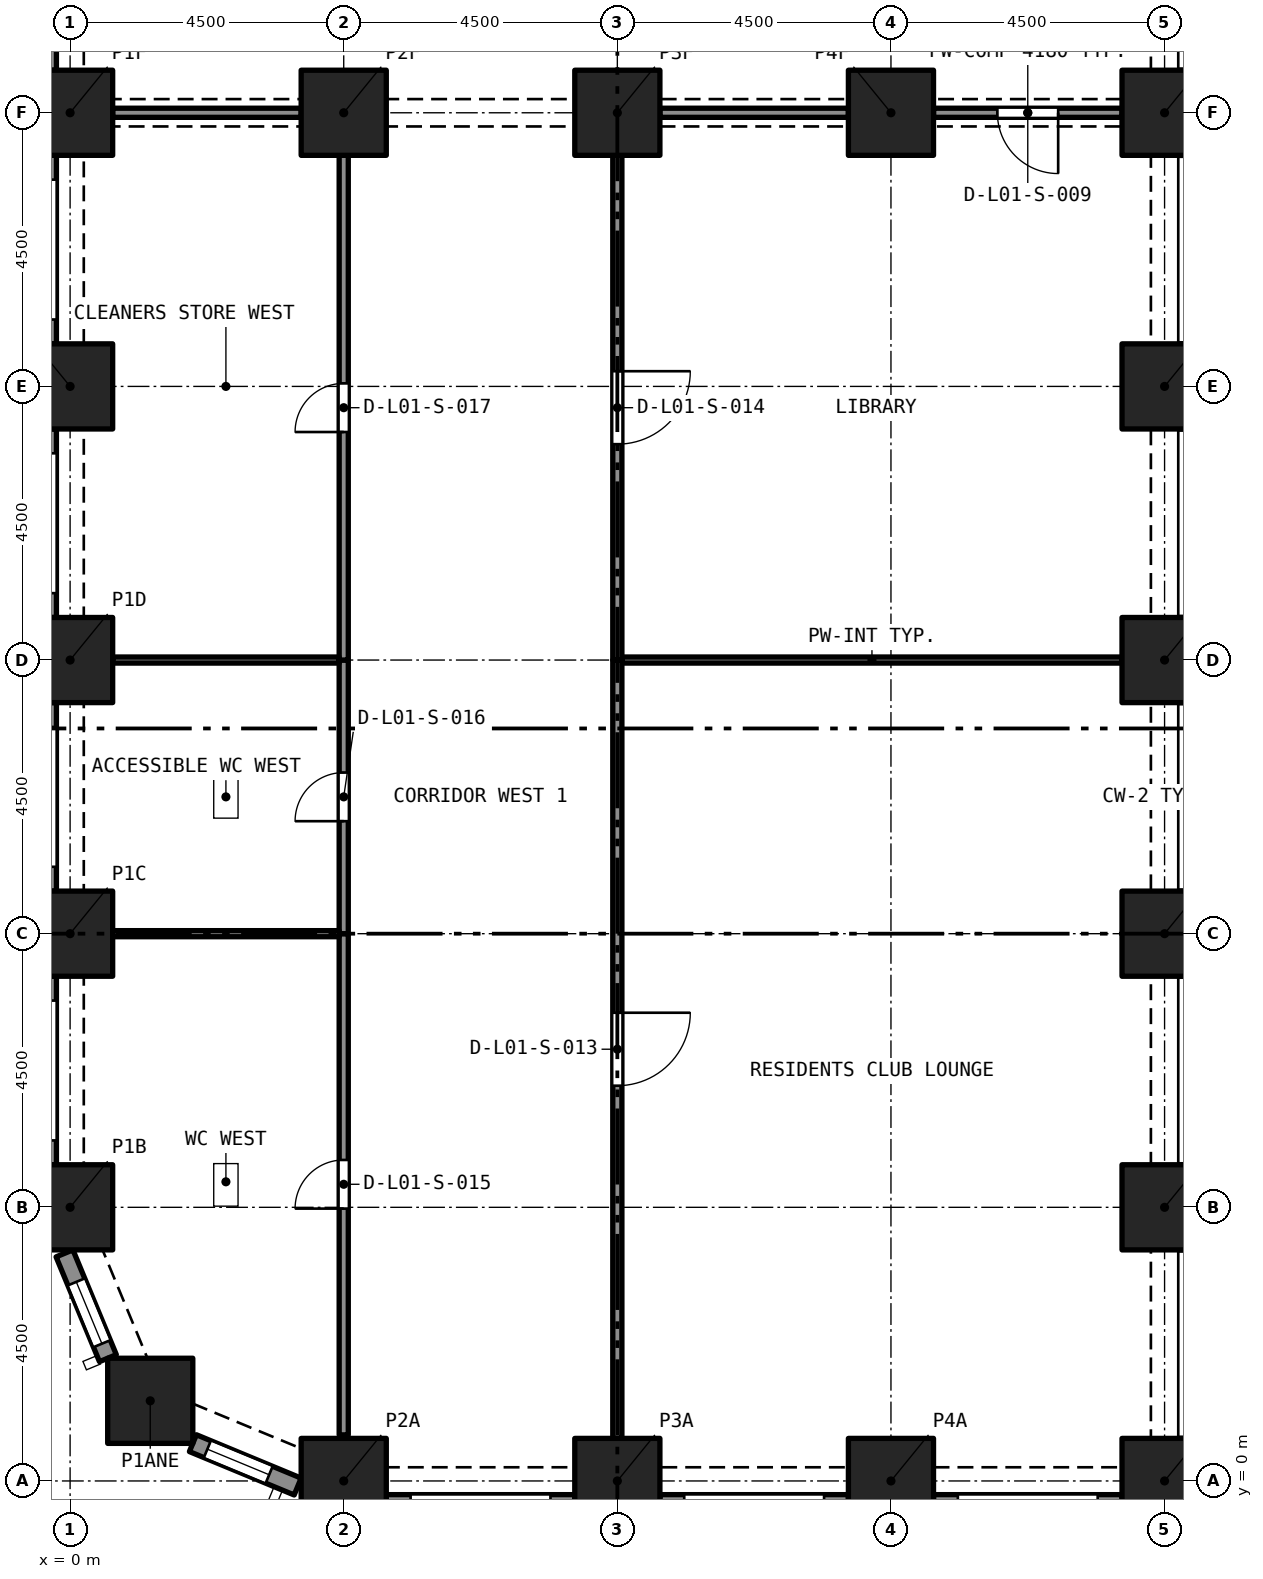
"""IFC4 building model, lengths in metres.
Left out: names, types, materials, properties, quantities, classifications, styles, units other than length and angle.
Written with IfcOpenShell. Run it as: python <this file> out.ifc"""

import sys

from ifc_helpers import new_model, si_unit, direction, frame, frame_2d, origin, origin_2d, place, context, subcontext, project, spatial, rectangle, extrude, element, fill, save


model = new_model("IFC4")
c1 = context("Model", 3, precision=1e-05, world=origin(), true_north=direction((0.0, 1.0)))
c2 = subcontext(c1, "Body", "Model", "MODEL_VIEW")
j1 = project(units=[si_unit("LENGTHUNIT", "METRE"), si_unit("PLANEANGLEUNIT", "RADIAN")], contexts=[c1])
p1 = place(None, origin())
s1 = spatial("IfcSite", under=j1, at=p1, CompositionType="ELEMENT")
p2 = place(p1, origin())
s2 = spatial("IfcBuilding", under=s1, at=p2, CompositionType="ELEMENT")
p3 = place(p2, frame((0.0, 0.0, 6.0)))
s3 = spatial("IfcBuildingStorey", under=s2, at=p3, CompositionType="ELEMENT", Elevation=6.0)
for number, where, z_axis, x_axis in (
    (1, (4.5, 0.0, 0.0), (0.0, 0.0, 1.0), (1.0, 0.0, 0.0)),
    (2, (9.0, 0.0, 0.0), (0.0, 0.0, 1.0), (1.0, 0.0, 0.0)),
    (3, (13.5, 0.0, 0.0), (0.0, 0.0, 1.0), (1.0, 0.0, 0.0)),
    (4, (18.0, 0.0, 0.0), (0.0, 0.0, 1.0), (1.0, 0.0, 0.0)),
    (5, (1.318, 1.318, 0.0), (0.0, 0.0, 1.0), (1.0, 0.0, 0.0)),
    (6, (0.0, 4.5, 0.0), (0.0, 0.0, 1.0), (1.0, 0.0, 0.0)),
    (7, (18.0, 4.5, 0.0), (0.0, 0.0, 1.0), (1.0, 0.0, 0.0)),
    (8, (0.0, 9.0, 0.0), (0.0, 0.0, 1.0), (1.0, 0.0, 0.0)),
    (9, (18.0, 9.0, 0.0), (0.0, 0.0, 1.0), (1.0, 0.0, 0.0)),
    (10, (0.0, 13.5, 0.0), (0.0, 0.0, 1.0), (1.0, 0.0, 0.0)),
    (11, (18.0, 13.5, 0.0), (0.0, 0.0, 1.0), (1.0, 0.0, 0.0)),
    (12, (0.0, 18.0, 0.0), (0.0, 0.0, 1.0), (1.0, 0.0, 0.0)),
    (13, (18.0, 18.0, 0.0), (0.0, 0.0, 1.0), (1.0, 0.0, 0.0)),
    (14, (0.0, 22.5, 0.0), (0.0, 0.0, 1.0), (1.0, 0.0, 0.0)),
    (15, (4.5, 22.5, 0.0), (0.0, 0.0, 1.0), (1.0, 0.0, 0.0)),
    (16, (9.0, 22.5, 0.0), (0.0, 0.0, 1.0), (1.0, 0.0, 0.0)),
    (17, (13.5, 22.5, 0.0), (0.0, 0.0, 1.0), (1.0, 0.0, 0.0)),
    (18, (18.0, 22.5, 0.0), (0.0, 0.0, 1.0), (1.0, 0.0, 0.0)),
):
    element("IfcColumn", number, at=place(p3, frame(where, z_axis=z_axis, x_axis=x_axis)), inside=s3, PredefinedType="COLUMN", context=c2, shape_type="SweptSolid", body=[
        extrude(rectangle(XDim=1.4, YDim=1.4, at=origin_2d()), origin(), (0.0, 0.0, 1.0), 5.0),
    ])
p4 = place(p3, frame((-0.375, 23.2, 0.0), z_axis=(0.0, 0.0, 1.0), x_axis=(0.0, 1.0, 0.0)))
e19 = element("IfcWall", 19, at=p4, inside=s3, PredefinedType="SOLIDWALL", context=c2, shape_type="SweptSolid", body=[
    extrude(rectangle(XDim=3.1, YDim=0.3, at=frame_2d((1.55, 0.0))), origin(), (0.0, 0.0, 1.0), 5.0),
])
p5 = place(p4, frame((0.4, 0.0, 0.45)))
e20 = element("IfcOpeningElement", 20, at=p5, cuts=e19, PredefinedType="OPENING", context=c2, shape_type="SweptSolid", body=[
    extrude(rectangle(XDim=2.3, YDim=3.3, at=frame_2d((1.15, 1.65))), frame((0.0, 0.16, 0.0), z_axis=(0.0, -1.0, 0.0), x_axis=(1.0, 0.0, 0.0)), (0.0, 0.0, 1.0), 0.32),
])
p6 = place(p3, frame((-0.375, 18.7, 0.0), z_axis=(0.0, 0.0, 1.0), x_axis=(0.0, 1.0, 0.0)))
e21 = element("IfcWall", 21, at=p6, inside=s3, PredefinedType="SOLIDWALL", context=c2, shape_type="SweptSolid", body=[
    extrude(rectangle(XDim=3.1, YDim=0.3, at=frame_2d((1.55, 0.0))), origin(), (0.0, 0.0, 1.0), 5.0),
])
p7 = place(p6, frame((0.4, 0.0, 0.45)))
e22 = element("IfcOpeningElement", 22, at=p7, cuts=e21, PredefinedType="OPENING", context=c2, shape_type="SweptSolid", body=[
    extrude(rectangle(XDim=2.3, YDim=3.3, at=frame_2d((1.15, 1.65))), frame((0.0, 0.16, 0.0), z_axis=(0.0, -1.0, 0.0), x_axis=(1.0, 0.0, 0.0)), (0.0, 0.0, 1.0), 0.32),
])
p8 = place(p3, frame((-0.375, 14.2, 0.0), z_axis=(0.0, 0.0, 1.0), x_axis=(0.0, 1.0, 0.0)))
e23 = element("IfcWall", 23, at=p8, inside=s3, PredefinedType="SOLIDWALL", context=c2, shape_type="SweptSolid", body=[
    extrude(rectangle(XDim=3.1, YDim=0.3, at=frame_2d((1.55, 0.0))), origin(), (0.0, 0.0, 1.0), 5.0),
])
p9 = place(p8, frame((0.4, 0.0, 0.45)))
e24 = element("IfcOpeningElement", 24, at=p9, cuts=e23, PredefinedType="OPENING", context=c2, shape_type="SweptSolid", body=[
    extrude(rectangle(XDim=2.3, YDim=3.3, at=frame_2d((1.15, 1.65))), frame((0.0, 0.16, 0.0), z_axis=(0.0, -1.0, 0.0), x_axis=(1.0, 0.0, 0.0)), (0.0, 0.0, 1.0), 0.32),
])
p10 = place(p3, frame((-0.375, 9.7, 0.0), z_axis=(0.0, 0.0, 1.0), x_axis=(0.0, 1.0, 0.0)))
e25 = element("IfcWall", 25, at=p10, inside=s3, PredefinedType="SOLIDWALL", context=c2, shape_type="SweptSolid", body=[
    extrude(rectangle(XDim=3.1, YDim=0.3, at=frame_2d((1.55, 0.0))), origin(), (0.0, 0.0, 1.0), 5.0),
])
p11 = place(p10, frame((0.4, 0.0, 0.45)))
e26 = element("IfcOpeningElement", 26, at=p11, cuts=e25, PredefinedType="OPENING", context=c2, shape_type="SweptSolid", body=[
    extrude(rectangle(XDim=2.3, YDim=3.3, at=frame_2d((1.15, 1.65))), frame((0.0, 0.16, 0.0), z_axis=(0.0, -1.0, 0.0), x_axis=(1.0, 0.0, 0.0)), (0.0, 0.0, 1.0), 0.32),
])
p12 = place(p3, frame((-0.375, 5.2, 0.0), z_axis=(0.0, 0.0, 1.0), x_axis=(0.0, 1.0, 0.0)))
e27 = element("IfcWall", 27, at=p12, inside=s3, PredefinedType="SOLIDWALL", context=c2, shape_type="SweptSolid", body=[
    extrude(rectangle(XDim=3.1, YDim=0.3, at=frame_2d((1.55, 0.0))), origin(), (0.0, 0.0, 1.0), 5.0),
])
p13 = place(p12, frame((0.4, 0.0, 0.45)))
e28 = element("IfcOpeningElement", 28, at=p13, cuts=e27, PredefinedType="OPENING", context=c2, shape_type="SweptSolid", body=[
    extrude(rectangle(XDim=2.3, YDim=3.3, at=frame_2d((1.15, 1.65))), frame((0.0, 0.16, 0.0), z_axis=(0.0, -1.0, 0.0), x_axis=(1.0, 0.0, 0.0)), (0.0, 0.0, 1.0), 0.32),
])
p14 = place(p3, frame((0.622, 2.02, 0.0), z_axis=(0.0, 0.0, 1.0), x_axis=(-0.38262540684, 0.923903565336, 0.0)))
e29 = element("IfcWall", 29, at=p14, inside=s3, PredefinedType="SOLIDWALL", context=c2, shape_type="SweptSolid", body=[
    extrude(rectangle(XDim=1.865, YDim=0.3, at=frame_2d((0.933, 0.0))), origin(), (0.0, 0.0, 1.0), 5.0),
])
p15 = place(p14, frame((0.258, 0.0, 0.45)))
e30 = element("IfcOpeningElement", 30, at=p15, cuts=e29, PredefinedType="OPENING", context=c2, shape_type="SweptSolid", body=[
    extrude(rectangle(XDim=1.1, YDim=3.3, at=frame_2d((0.55, 1.65))), frame((0.0, 0.16, 0.0), z_axis=(0.0, -1.0, 0.0), x_axis=(1.0, 0.0, 0.0)), (0.0, 0.0, 1.0), 0.32),
])
p16 = place(p3, frame((3.743, -0.092, 0.0), z_axis=(0.0, 0.0, 1.0), x_axis=(-0.923857286003, 0.382737135771, 0.0)))
e31 = element("IfcWall", 31, at=p16, inside=s3, PredefinedType="SOLIDWALL", context=c2, shape_type="SweptSolid", body=[
    extrude(rectangle(XDim=1.865, YDim=0.3, at=frame_2d((0.933, 0.0))), origin(), (0.0, 0.0, 1.0), 5.0),
])
p17 = place(p16, frame((0.508, 0.0, 0.45)))
e32 = element("IfcOpeningElement", 32, at=p17, cuts=e31, PredefinedType="OPENING", context=c2, shape_type="SweptSolid", body=[
    extrude(rectangle(XDim=1.1, YDim=3.3, at=frame_2d((0.55, 1.65))), frame((0.0, 0.16, 0.0), z_axis=(0.0, -1.0, 0.0), x_axis=(1.0, 0.0, 0.0)), (0.0, 0.0, 1.0), 0.32),
])
p18 = place(p3, frame((8.3, -0.375, 0.0), z_axis=(0.0, 0.0, 1.0), x_axis=(-1.0, 0.0, 0.0)))
e33 = element("IfcWall", 33, at=p18, inside=s3, PredefinedType="SOLIDWALL", context=c2, shape_type="SweptSolid", body=[
    extrude(rectangle(XDim=3.1, YDim=0.3, at=frame_2d((1.55, 0.0))), origin(), (0.0, 0.0, 1.0), 5.0),
])
p19 = place(p18, frame((0.4, 0.0, 0.45)))
e34 = element("IfcOpeningElement", 34, at=p19, cuts=e33, PredefinedType="OPENING", context=c2, shape_type="SweptSolid", body=[
    extrude(rectangle(XDim=2.3, YDim=3.3, at=frame_2d((1.15, 1.65))), frame((0.0, 0.16, 0.0), z_axis=(0.0, -1.0, 0.0), x_axis=(1.0, 0.0, 0.0)), (0.0, 0.0, 1.0), 0.32),
])
p20 = place(p3, frame((12.8, -0.375, 0.0), z_axis=(0.0, 0.0, 1.0), x_axis=(-1.0, 0.0, 0.0)))
e35 = element("IfcWall", 35, at=p20, inside=s3, PredefinedType="SOLIDWALL", context=c2, shape_type="SweptSolid", body=[
    extrude(rectangle(XDim=3.1, YDim=0.3, at=frame_2d((1.55, 0.0))), origin(), (0.0, 0.0, 1.0), 5.0),
])
p21 = place(p20, frame((0.4, 0.0, 0.45)))
e36 = element("IfcOpeningElement", 36, at=p21, cuts=e35, PredefinedType="OPENING", context=c2, shape_type="SweptSolid", body=[
    extrude(rectangle(XDim=2.3, YDim=3.3, at=frame_2d((1.15, 1.65))), frame((0.0, 0.16, 0.0), z_axis=(0.0, -1.0, 0.0), x_axis=(1.0, 0.0, 0.0)), (0.0, 0.0, 1.0), 0.32),
])
p22 = place(p3, frame((17.3, -0.375, 0.0), z_axis=(0.0, 0.0, 1.0), x_axis=(-1.0, 0.0, 0.0)))
e37 = element("IfcWall", 37, at=p22, inside=s3, PredefinedType="SOLIDWALL", context=c2, shape_type="SweptSolid", body=[
    extrude(rectangle(XDim=3.1, YDim=0.3, at=frame_2d((1.55, 0.0))), origin(), (0.0, 0.0, 1.0), 5.0),
])
p23 = place(p22, frame((0.4, 0.0, 0.45)))
e38 = element("IfcOpeningElement", 38, at=p23, cuts=e37, PredefinedType="OPENING", context=c2, shape_type="SweptSolid", body=[
    extrude(rectangle(XDim=2.3, YDim=3.3, at=frame_2d((1.15, 1.65))), frame((0.0, 0.16, 0.0), z_axis=(0.0, -1.0, 0.0), x_axis=(1.0, 0.0, 0.0)), (0.0, 0.0, 1.0), 0.32),
])
p24 = place(p3, frame((17.3, 22.5, 0.0), z_axis=(0.0, 0.0, 1.0), x_axis=(-1.0, 0.0, 0.0)))
e39 = element("IfcWall", 39, at=p24, inside=s3, PredefinedType="PARTITIONING", context=c2, shape_type="SweptSolid", body=[
    extrude(rectangle(XDim=3.1, YDim=0.15, at=frame_2d((1.55, 0.0))), origin(), (0.0, 0.0, 1.0), 4.18),
])
p25 = place(p24, frame((1.05, 0.0, 0.0)))
e40 = element("IfcOpeningElement", 40, at=p25, cuts=e39, PredefinedType="OPENING", context=c2, shape_type="SweptSolid", body=[
    extrude(rectangle(XDim=1.0, YDim=2.1, at=frame_2d((0.5, 1.05))), frame((0.0, 0.085, 0.0), z_axis=(0.0, -1.0, 0.0), x_axis=(1.0, 0.0, 0.0)), (0.0, 0.0, 1.0), 0.17),
])
for number, where, z_axis, x_axis in (
    (41, (9.7, 22.5, 0.0), (0.0, 0.0, 1.0), (1.0, 0.0, 0.0)),
    (42, (0.7, 22.5, 0.0), (0.0, 0.0, 1.0), (1.0, 0.0, 0.0)),
):
    element("IfcWall", number, at=place(p3, frame(where, z_axis=z_axis, x_axis=x_axis)), inside=s3, PredefinedType="PARTITIONING", context=c2, shape_type="SweptSolid", body=[
        extrude(rectangle(XDim=3.1, YDim=0.15, at=frame_2d((1.55, 0.0))), origin(), (0.0, 0.0, 1.0), 4.18),
    ])
p26 = place(p3, frame((9.075, 13.5, 0.0), z_axis=(0.0, 0.0, 1.0), x_axis=(1.0, 0.0, 0.0)))
e43 = element("IfcWall", 43, at=p26, inside=s3, PredefinedType="PARTITIONING", context=c2, shape_type="SweptSolid", body=[
    extrude(rectangle(XDim=8.225, YDim=0.1, at=frame_2d((4.113, 0.0))), origin(), (0.0, 0.0, 1.0), 4.65),
])
p27 = place(p3, frame((9.0, 13.5, 0.0), z_axis=(0.0, 0.0, 1.0), x_axis=(0.0, -1.0, 0.0)))
e44 = element("IfcWall", 44, at=p27, inside=s3, PredefinedType="PARTITIONING", context=c2, shape_type="SweptSolid", body=[
    extrude(rectangle(XDim=12.8, YDim=0.15, at=frame_2d((6.4, 0.0))), origin(), (0.0, 0.0, 1.0), 4.65),
])
p28 = place(p27, frame((5.8, 0.0, 0.0)))
e45 = element("IfcOpeningElement", 45, at=p28, cuts=e44, PredefinedType="OPENING", context=c2, shape_type="SweptSolid", body=[
    extrude(rectangle(XDim=1.2, YDim=2.1, at=frame_2d((0.6, 1.05))), frame((0.0, 0.085, 0.0), z_axis=(0.0, -1.0, 0.0), x_axis=(1.0, 0.0, 0.0)), (0.0, 0.0, 1.0), 0.17),
])
p29 = place(p3, frame((9.0, 21.8, 0.0), z_axis=(0.0, 0.0, 1.0), x_axis=(0.0, -1.0, 0.0)))
e46 = element("IfcWall", 46, at=p29, inside=s3, PredefinedType="PARTITIONING", context=c2, shape_type="SweptSolid", body=[
    extrude(rectangle(XDim=8.3, YDim=0.15, at=frame_2d((4.15, 0.0))), origin(), (0.0, 0.0, 1.0), 4.65),
])
p30 = place(p29, frame((3.55, 0.0, 0.0)))
e47 = element("IfcOpeningElement", 47, at=p30, cuts=e46, PredefinedType="OPENING", context=c2, shape_type="SweptSolid", body=[
    extrude(rectangle(XDim=1.2, YDim=2.1, at=frame_2d((0.6, 1.05))), frame((0.0, 0.085, 0.0), z_axis=(0.0, -1.0, 0.0), x_axis=(1.0, 0.0, 0.0)), (0.0, 0.0, 1.0), 0.17),
])
p31 = place(p3, frame((4.5, 0.758, 0.0), z_axis=(0.0, 0.0, 1.0), x_axis=(0.0, 1.0, 0.0)))
e48 = element("IfcWall", 48, at=p31, inside=s3, PredefinedType="PARTITIONING", context=c2, shape_type="SweptSolid", body=[
    extrude(rectangle(XDim=8.242, YDim=0.15, at=frame_2d((4.121, 0.0))), origin(), (0.0, 0.0, 1.0), 4.65),
])
p32 = place(p31, frame((3.721, 0.0, 0.0)))
e49 = element("IfcOpeningElement", 49, at=p32, cuts=e48, PredefinedType="OPENING", context=c2, shape_type="SweptSolid", body=[
    extrude(rectangle(XDim=0.8, YDim=2.1, at=frame_2d((0.4, 1.05))), frame((0.0, 0.085, 0.0), z_axis=(0.0, -1.0, 0.0), x_axis=(1.0, 0.0, 0.0)), (0.0, 0.0, 1.0), 0.17),
])
p33 = place(p3, frame((4.5, 9.0, 0.0), z_axis=(0.0, 0.0, 1.0), x_axis=(0.0, 1.0, 0.0)))
e50 = element("IfcWall", 50, at=p33, inside=s3, PredefinedType="PARTITIONING", context=c2, shape_type="SweptSolid", body=[
    extrude(rectangle(XDim=4.5, YDim=0.15, at=frame_2d((2.25, 0.0))), origin(), (0.0, 0.0, 1.0), 4.65),
])
p34 = place(p33, frame((1.85, 0.0, 0.0)))
e51 = element("IfcOpeningElement", 51, at=p34, cuts=e50, PredefinedType="OPENING", context=c2, shape_type="SweptSolid", body=[
    extrude(rectangle(XDim=0.8, YDim=2.1, at=frame_2d((0.4, 1.05))), frame((0.0, 0.085, 0.0), z_axis=(0.0, -1.0, 0.0), x_axis=(1.0, 0.0, 0.0)), (0.0, 0.0, 1.0), 0.17),
])
p35 = place(p3, frame((4.5, 13.5, 0.0), z_axis=(0.0, 0.0, 1.0), x_axis=(0.0, 1.0, 0.0)))
e52 = element("IfcWall", 52, at=p35, inside=s3, PredefinedType="PARTITIONING", context=c2, shape_type="SweptSolid", body=[
    extrude(rectangle(XDim=8.3, YDim=0.15, at=frame_2d((4.15, 0.0))), origin(), (0.0, 0.0, 1.0), 4.65),
])
p36 = place(p35, frame((3.75, 0.0, 0.0)))
e53 = element("IfcOpeningElement", 53, at=p36, cuts=e52, PredefinedType="OPENING", context=c2, shape_type="SweptSolid", body=[
    extrude(rectangle(XDim=0.8, YDim=2.1, at=frame_2d((0.4, 1.05))), frame((0.0, 0.085, 0.0), z_axis=(0.0, -1.0, 0.0), x_axis=(1.0, 0.0, 0.0)), (0.0, 0.0, 1.0), 0.17),
])
for number, where, z_axis, x_axis in (
    (54, (0.7, 9.0, 0.0), (0.0, 0.0, 1.0), (1.0, 0.0, 0.0)),
    (55, (0.7, 13.5, 0.0), (0.0, 0.0, 1.0), (1.0, 0.0, 0.0)),
):
    element("IfcWall", number, at=place(p3, frame(where, z_axis=z_axis, x_axis=x_axis)), inside=s3, PredefinedType="PARTITIONING", context=c2, shape_type="SweptSolid", body=[
        extrude(rectangle(XDim=3.725, YDim=0.1, at=frame_2d((1.863, 0.0))), origin(), (0.0, 0.0, 1.0), 4.65),
    ])
p37 = place(p15, origin())
e56 = element("IfcWindow", 56, at=p37, inside=s3, PartitioningType="SINGLE_PANEL", PredefinedType="WINDOW", context=c2, shape_type="SweptSolid", body=[
    extrude(rectangle(XDim=1.1, YDim=3.3, at=frame_2d((0.55, 1.65))), frame((0.0, 0.03, 0.0), z_axis=(0.0, -1.0, 0.0), x_axis=(1.0, 0.0, 0.0)), (0.0, 0.0, 1.0), 0.06),
])
fill(e30, e56)
p38 = place(p17, origin())
e57 = element("IfcWindow", 57, at=p38, inside=s3, PartitioningType="SINGLE_PANEL", PredefinedType="WINDOW", context=c2, shape_type="SweptSolid", body=[
    extrude(rectangle(XDim=1.1, YDim=3.3, at=frame_2d((0.55, 1.65))), frame((0.0, 0.03, 0.0), z_axis=(0.0, -1.0, 0.0), x_axis=(1.0, 0.0, 0.0)), (0.0, 0.0, 1.0), 0.06),
])
fill(e32, e57)
p39 = place(p25, origin())
e58 = element("IfcDoor", 58, at=p39, inside=s3, OperationType="SINGLE_SWING_RIGHT", PredefinedType="DOOR", context=c2, shape_type="SweptSolid", body=[
    extrude(rectangle(XDim=1.0, YDim=2.1, at=frame_2d((0.5, 1.05))), frame((0.0, 0.025, 0.0), z_axis=(0.0, -1.0, 0.0), x_axis=(1.0, 0.0, 0.0)), (0.0, 0.0, 1.0), 0.05),
])
fill(e40, e58)
p40 = place(p28, origin())
e59 = element("IfcDoor", 59, at=p40, inside=s3, OperationType="SINGLE_SWING_RIGHT", PredefinedType="DOOR", context=c2, shape_type="SweptSolid", body=[
    extrude(rectangle(XDim=1.2, YDim=2.1, at=frame_2d((0.6, 1.05))), frame((0.0, 0.025, 0.0), z_axis=(0.0, -1.0, 0.0), x_axis=(1.0, 0.0, 0.0)), (0.0, 0.0, 1.0), 0.05),
])
fill(e45, e59)
p41 = place(p30, origin())
e60 = element("IfcDoor", 60, at=p41, inside=s3, OperationType="SINGLE_SWING_RIGHT", PredefinedType="DOOR", context=c2, shape_type="SweptSolid", body=[
    extrude(rectangle(XDim=1.2, YDim=2.1, at=frame_2d((0.6, 1.05))), frame((0.0, 0.025, 0.0), z_axis=(0.0, -1.0, 0.0), x_axis=(1.0, 0.0, 0.0)), (0.0, 0.0, 1.0), 0.05),
])
fill(e47, e60)
p42 = place(p32, origin())
e61 = element("IfcDoor", 61, at=p42, inside=s3, OperationType="SINGLE_SWING_RIGHT", PredefinedType="DOOR", context=c2, shape_type="SweptSolid", body=[
    extrude(rectangle(XDim=0.8, YDim=2.1, at=frame_2d((0.4, 1.05))), frame((0.0, 0.025, 0.0), z_axis=(0.0, -1.0, 0.0), x_axis=(1.0, 0.0, 0.0)), (0.0, 0.0, 1.0), 0.05),
])
fill(e49, e61)
p43 = place(p34, origin())
e62 = element("IfcDoor", 62, at=p43, inside=s3, OperationType="SINGLE_SWING_RIGHT", PredefinedType="DOOR", context=c2, shape_type="SweptSolid", body=[
    extrude(rectangle(XDim=0.8, YDim=2.1, at=frame_2d((0.4, 1.05))), frame((0.0, 0.025, 0.0), z_axis=(0.0, -1.0, 0.0), x_axis=(1.0, 0.0, 0.0)), (0.0, 0.0, 1.0), 0.05),
])
fill(e51, e62)
p44 = place(p36, origin())
e63 = element("IfcDoor", 63, at=p44, inside=s3, OperationType="SINGLE_SWING_LEFT", PredefinedType="DOOR", context=c2, shape_type="SweptSolid", body=[
    extrude(rectangle(XDim=0.8, YDim=2.1, at=frame_2d((0.4, 1.05))), frame((0.0, 0.025, 0.0), z_axis=(0.0, -1.0, 0.0), x_axis=(1.0, 0.0, 0.0)), (0.0, 0.0, 1.0), 0.05),
])
fill(e53, e63)
save(model, sys.argv[1])
